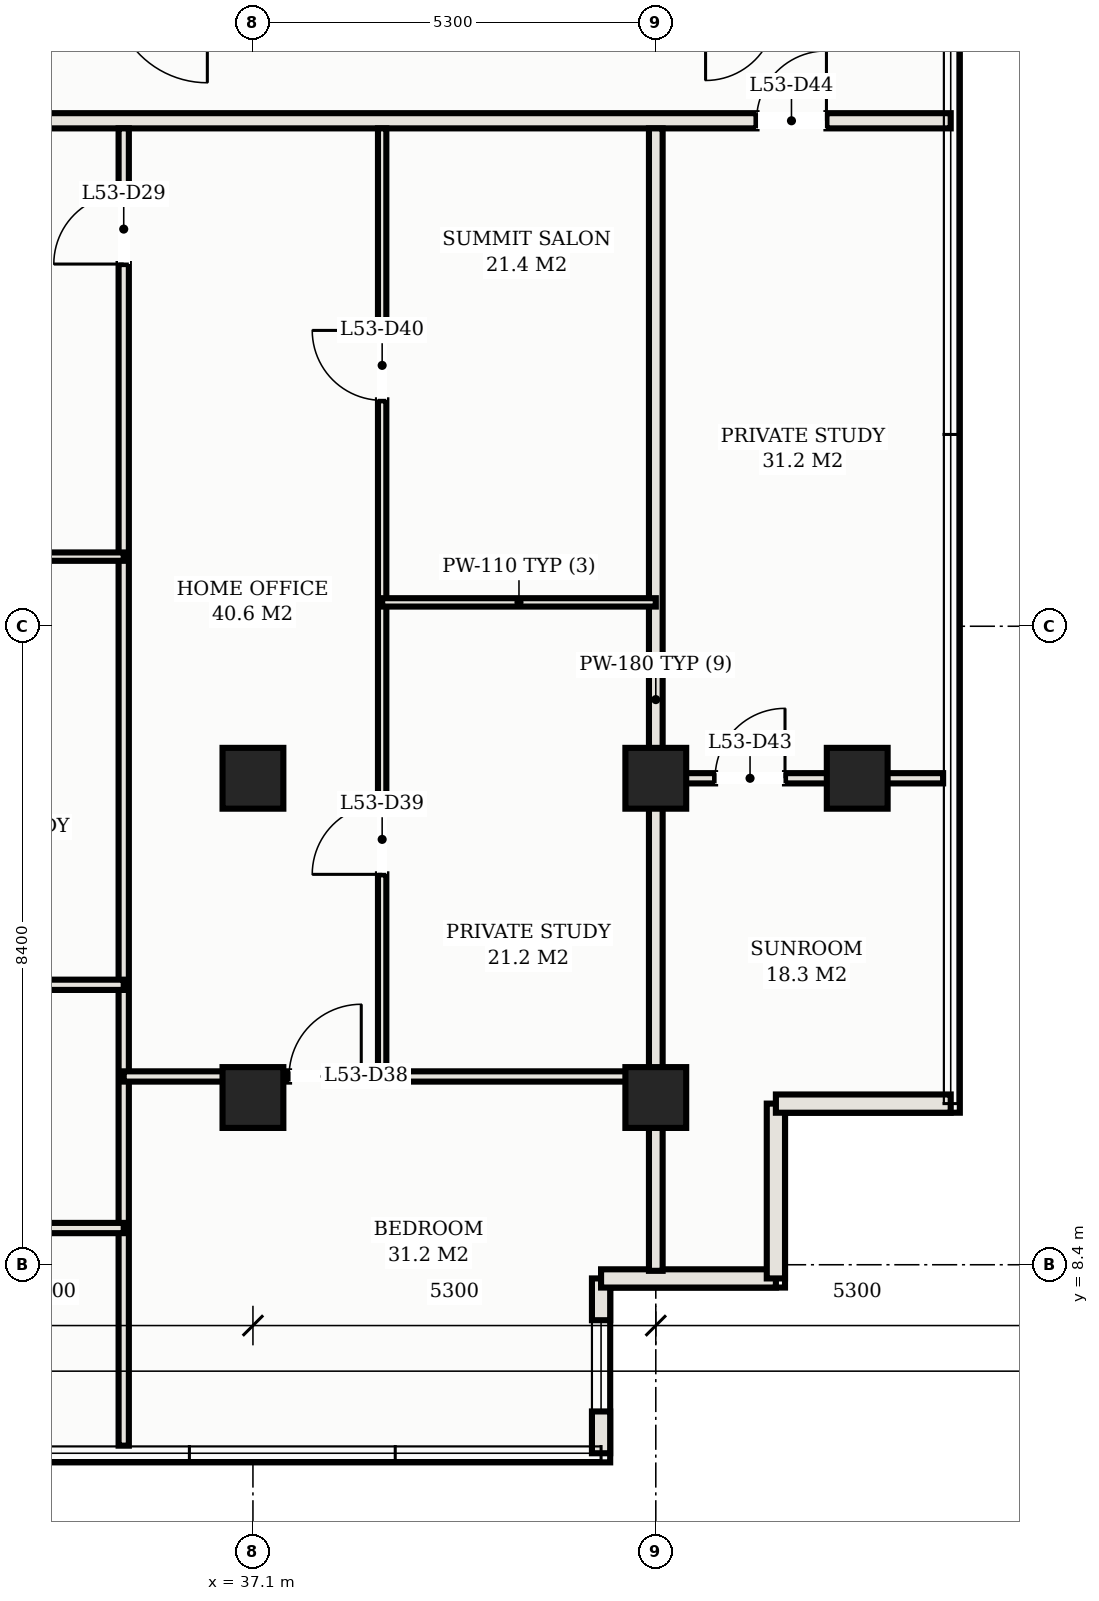
"""IFC4 building model, lengths in metres.
Left out: names, types, materials, properties, quantities, classifications, styles, units other than length and angle.
Written with IfcOpenShell. Run it as: python <this file> out.ifc"""

import sys

from ifc_helpers import new_model, si_unit, direction, frame, frame_2d, origin, origin_2d, place, context, subcontext, project, spatial, rectangle, hollow_rectangle, extrude, element, fill, save


model = new_model("IFC4")
c1 = context("Model", 3, precision=1e-05, world=origin(), true_north=direction((0.0, 1.0)))
c2 = subcontext(c1, "Body", "Model", "MODEL_VIEW")
j1 = project(units=[si_unit("LENGTHUNIT", "METRE"), si_unit("PLANEANGLEUNIT", "RADIAN")], contexts=[c1])
p1 = place(None, origin())
s1 = spatial("IfcSite", under=j1, at=p1, CompositionType="ELEMENT")
p2 = place(p1, origin())
s2 = spatial("IfcBuilding", under=s1, at=p2, CompositionType="ELEMENT")
p3 = place(p2, frame((0.0, 0.0, 196.7)))
s3 = spatial("IfcBuildingStorey", under=s2, at=p3, CompositionType="ELEMENT", Elevation=196.7)
for number, where, z_axis, x_axis in (
    (1, (37.1, 14.8, 0.0), (0.0, 0.0, 1.0), (1.0, 0.0, 0.0)),
    (2, (37.1, 10.6, 0.0), (0.0, 0.0, 1.0), (1.0, 0.0, 0.0)),
    (3, (42.4, 14.8, 0.0), (0.0, 0.0, 1.0), (1.0, 0.0, 0.0)),
    (4, (42.4, 10.6, 0.0), (0.0, 0.0, 1.0), (1.0, 0.0, 0.0)),
    (5, (45.05, 14.8, 0.0), (0.0, 0.0, 1.0), (1.0, 0.0, 0.0)),
):
    element("IfcColumn", number, at=place(p3, frame(where, z_axis=z_axis, x_axis=x_axis)), inside=s3, PredefinedType="COLUMN", context=c2, shape_type="SweptSolid", body=[
        extrude(hollow_rectangle(XDim=0.8, YDim=0.8, WallThickness=0.028, at=origin_2d()), origin(), (0.0, 0.0, 1.0), 3.3),
    ])
p4 = place(p3, frame((41.68, 5.92, 0.0), z_axis=(0.0, 0.0, 1.0), x_axis=(0.0, 1.0, 0.0)))
e6 = element("IfcWall", 6, at=p4, inside=s3, PredefinedType="SOLIDWALL", context=c2, shape_type="SweptSolid", body=[
    extrude(rectangle(XDim=2.3, YDim=0.24, at=frame_2d((1.15, 0.0))), origin(), (0.0, 0.0, 1.0), 3.11),
])
p5 = place(p4, frame((0.55, 0.0, 0.75)))
e7 = element("IfcOpeningElement", 7, at=p5, cuts=e6, PredefinedType="OPENING", context=c2, shape_type="SweptSolid", body=[
    extrude(rectangle(XDim=1.2, YDim=1.5, at=frame_2d((0.6, 0.75))), frame((0.0, 0.13, 0.0), z_axis=(0.0, -1.0, 0.0), x_axis=(1.0, 0.0, 0.0)), (0.0, 0.0, 1.0), 0.26),
])
for number, where, z_axis, x_axis in (
    (8, (41.68, 8.22, 0.0), (0.0, 0.0, 1.0), (1.0, 0.0, 0.0)),
    (9, (43.98, 8.22, 0.0), (0.0, 0.0, 1.0), (0.0, 1.0, 0.0)),
    (10, (43.98, 10.52, 0.0), (0.0, 0.0, 1.0), (1.0, 0.0, 0.0)),
):
    element("IfcWall", number, at=place(p3, frame(where, z_axis=z_axis, x_axis=x_axis)), inside=s3, PredefinedType="SOLIDWALL", context=c2, shape_type="SweptSolid", body=[
        extrude(rectangle(XDim=2.3, YDim=0.24, at=frame_2d((1.15, 0.0))), origin(), (0.0, 0.0, 1.0), 3.11),
    ])
p6 = place(p3, frame((6.72, 23.45, 0.0), z_axis=(0.0, 0.0, 1.0), x_axis=(1.0, 0.0, 0.0)))
e11 = element("IfcWall", 11, at=p6, inside=s3, PredefinedType="PARTITIONING", context=c2, shape_type="SweptSolid", body=[
    extrude(rectangle(XDim=39.56, YDim=0.2, at=frame_2d((19.78, 0.0))), origin(), (0.0, 0.0, 1.0), 2.43),
])
p7 = place(p6, frame((4.63, 0.0, 0.0)))
e12 = element("IfcOpeningElement", 12, at=p7, cuts=e11, PredefinedType="OPENING", context=c2, shape_type="SweptSolid", body=[
    extrude(rectangle(XDim=1.1, YDim=2.25, at=frame_2d((0.55, 1.125))), frame((0.0, 0.11, 0.0), z_axis=(0.0, -1.0, 0.0), x_axis=(1.0, 0.0, 0.0)), (0.0, 0.0, 1.0), 0.22),
])
p8 = place(p6, frame((9.93, 0.0, 0.0)))
e13 = element("IfcOpeningElement", 13, at=p8, cuts=e11, PredefinedType="OPENING", context=c2, shape_type="SweptSolid", body=[
    extrude(rectangle(XDim=1.1, YDim=2.25, at=frame_2d((0.55, 1.125))), frame((0.0, 0.11, 0.0), z_axis=(0.0, -1.0, 0.0), x_axis=(1.0, 0.0, 0.0)), (0.0, 0.0, 1.0), 0.22),
])
p9 = place(p6, frame((15.23, 0.0, 0.0)))
e14 = element("IfcOpeningElement", 14, at=p9, cuts=e11, PredefinedType="OPENING", context=c2, shape_type="SweptSolid", body=[
    extrude(rectangle(XDim=1.1, YDim=2.25, at=frame_2d((0.55, 1.125))), frame((0.0, 0.11, 0.0), z_axis=(0.0, -1.0, 0.0), x_axis=(1.0, 0.0, 0.0)), (0.0, 0.0, 1.0), 0.22),
])
p10 = place(p6, frame((1.635, 0.0, 0.0)))
e15 = element("IfcOpeningElement", 15, at=p10, cuts=e11, PredefinedType="OPENING", context=c2, shape_type="SweptSolid", body=[
    extrude(rectangle(XDim=0.92, YDim=2.15, at=frame_2d((0.46, 1.075))), frame((0.0, 0.11, 0.0), z_axis=(0.0, -1.0, 0.0), x_axis=(1.0, 0.0, 0.0)), (0.0, 0.0, 1.0), 0.22),
])
p11 = place(p6, frame((37.005, 0.0, 0.0)))
e16 = element("IfcOpeningElement", 16, at=p11, cuts=e11, PredefinedType="OPENING", context=c2, shape_type="SweptSolid", body=[
    extrude(rectangle(XDim=0.92, YDim=2.15, at=frame_2d((0.46, 1.075))), frame((0.0, 0.11, 0.0), z_axis=(0.0, -1.0, 0.0), x_axis=(1.0, 0.0, 0.0)), (0.0, 0.0, 1.0), 0.22),
])
p12 = place(p3, frame((42.4, 8.32, 0.0), z_axis=(0.0, 0.0, 1.0), x_axis=(0.0, 1.0, 0.0)))
e17 = element("IfcWall", 17, at=p12, inside=s3, PredefinedType="PARTITIONING", context=c2, shape_type="SweptSolid", body=[
    extrude(rectangle(XDim=15.03, YDim=0.18, at=frame_2d((7.515, 0.0))), origin(), (0.0, 0.0, 1.0), 2.43),
])
p13 = place(p3, frame((35.4, 6.02, 0.0), z_axis=(0.0, 0.0, 1.0), x_axis=(0.0, 1.0, 0.0)))
e18 = element("IfcWall", 18, at=p13, inside=s3, PredefinedType="PARTITIONING", context=c2, shape_type="SweptSolid", body=[
    extrude(rectangle(XDim=17.33, YDim=0.135, at=frame_2d((8.665, 0.0))), origin(), (0.0, 0.0, 1.0), 2.43),
])
p14 = place(p13, frame((15.545, 0.0, 0.0)))
e19 = element("IfcOpeningElement", 19, at=p14, cuts=e18, PredefinedType="OPENING", context=c2, shape_type="SweptSolid", body=[
    extrude(rectangle(XDim=0.92, YDim=2.15, at=frame_2d((0.46, 1.075))), frame((0.0, 0.078, 0.0), z_axis=(0.0, -1.0, 0.0), x_axis=(1.0, 0.0, 0.0)), (0.0, 0.0, 1.0), 0.155),
])
p15 = place(p3, frame((26.5, 8.883, 0.0), z_axis=(0.0, 0.0, 1.0), x_axis=(1.0, 0.0, 0.0)))
e20 = element("IfcWall", 20, at=p15, inside=s3, PredefinedType="PARTITIONING", context=c2, shape_type="SweptSolid", body=[
    extrude(rectangle(XDim=8.9, YDim=0.135, at=frame_2d((4.45, 0.0))), origin(), (0.0, 0.0, 1.0), 2.43),
])
p16 = place(p15, frame((2.175, 0.0, 0.0)))
e21 = element("IfcOpeningElement", 21, at=p16, cuts=e20, PredefinedType="OPENING", context=c2, shape_type="SweptSolid", body=[
    extrude(rectangle(XDim=0.95, YDim=2.15, at=frame_2d((0.475, 1.075))), frame((0.0, 0.078, 0.0), z_axis=(0.0, -1.0, 0.0), x_axis=(1.0, 0.0, 0.0)), (0.0, 0.0, 1.0), 0.155),
])
p17 = place(p15, frame((6.65, 0.0, 0.0)))
e22 = element("IfcOpeningElement", 22, at=p17, cuts=e20, PredefinedType="OPENING", context=c2, shape_type="SweptSolid", body=[
    extrude(rectangle(XDim=0.9, YDim=2.15, at=frame_2d((0.45, 1.075))), frame((0.0, 0.078, 0.0), z_axis=(0.0, -1.0, 0.0), x_axis=(1.0, 0.0, 0.0)), (0.0, 0.0, 1.0), 0.155),
])
p18 = place(p3, frame((31.8, 12.083, 0.0), z_axis=(0.0, 0.0, 1.0), x_axis=(1.0, 0.0, 0.0)))
e23 = element("IfcWall", 23, at=p18, inside=s3, PredefinedType="PARTITIONING", context=c2, shape_type="SweptSolid", body=[
    extrude(rectangle(XDim=3.6, YDim=0.135, at=frame_2d((1.8, 0.0))), origin(), (0.0, 0.0, 1.0), 2.43),
])
p19 = place(p3, frame((31.8, 17.716, 0.0), z_axis=(0.0, 0.0, 1.0), x_axis=(1.0, 0.0, 0.0)))
e24 = element("IfcWall", 24, at=p19, inside=s3, PredefinedType="MOVABLE", context=c2, shape_type="SweptSolid", body=[
    extrude(rectangle(XDim=3.6, YDim=0.11, at=frame_2d((1.8, 0.0))), origin(), (0.0, 0.0, 1.0), 2.43),
])
p20 = place(p19, frame((1.34, 0.0, 0.0)))
e25 = element("IfcOpeningElement", 25, at=p20, cuts=e24, PredefinedType="OPENING", context=c2, shape_type="SweptSolid", body=[
    extrude(rectangle(XDim=0.92, YDim=2.15, at=frame_2d((0.46, 1.075))), frame((0.0, 0.065, 0.0), z_axis=(0.0, -1.0, 0.0), x_axis=(1.0, 0.0, 0.0)), (0.0, 0.0, 1.0), 0.13),
])
p21 = place(p3, frame((35.4, 10.877, 0.0), z_axis=(0.0, 0.0, 1.0), x_axis=(1.0, 0.0, 0.0)))
e26 = element("IfcWall", 26, at=p21, inside=s3, PredefinedType="PARTITIONING", context=c2, shape_type="SweptSolid", body=[
    extrude(rectangle(XDim=7.0, YDim=0.135, at=frame_2d((3.5, 0.0))), origin(), (0.0, 0.0, 1.0), 2.43),
])
p22 = place(p21, frame((2.175, 0.0, 0.0)))
e27 = element("IfcOpeningElement", 27, at=p22, cuts=e26, PredefinedType="OPENING", context=c2, shape_type="SweptSolid", body=[
    extrude(rectangle(XDim=0.95, YDim=2.15, at=frame_2d((0.475, 1.075))), frame((0.0, 0.078, 0.0), z_axis=(0.0, -1.0, 0.0), x_axis=(1.0, 0.0, 0.0)), (0.0, 0.0, 1.0), 0.155),
])
p23 = place(p3, frame((38.8, 10.877, 0.0), z_axis=(0.0, 0.0, 1.0), x_axis=(0.0, 1.0, 0.0)))
e28 = element("IfcWall", 28, at=p23, inside=s3, PredefinedType="MOVABLE", context=c2, shape_type="SweptSolid", body=[
    extrude(rectangle(XDim=12.473, YDim=0.11, at=frame_2d((6.237, 0.0))), origin(), (0.0, 0.0, 1.0), 2.43),
])
p24 = place(p23, frame((2.659, 0.0, 0.0)))
e29 = element("IfcOpeningElement", 29, at=p24, cuts=e28, PredefinedType="OPENING", context=c2, shape_type="SweptSolid", body=[
    extrude(rectangle(XDim=0.92, YDim=2.15, at=frame_2d((0.46, 1.075))), frame((0.0, 0.065, 0.0), z_axis=(0.0, -1.0, 0.0), x_axis=(1.0, 0.0, 0.0)), (0.0, 0.0, 1.0), 0.13),
])
p25 = place(p23, frame((8.895, 0.0, 0.0)))
e30 = element("IfcOpeningElement", 30, at=p25, cuts=e28, PredefinedType="OPENING", context=c2, shape_type="SweptSolid", body=[
    extrude(rectangle(XDim=0.92, YDim=2.15, at=frame_2d((0.46, 1.075))), frame((0.0, 0.065, 0.0), z_axis=(0.0, -1.0, 0.0), x_axis=(1.0, 0.0, 0.0)), (0.0, 0.0, 1.0), 0.13),
])
p26 = place(p3, frame((38.8, 17.114, 0.0), z_axis=(0.0, 0.0, 1.0), x_axis=(1.0, 0.0, 0.0)))
e31 = element("IfcWall", 31, at=p26, inside=s3, PredefinedType="MOVABLE", context=c2, shape_type="SweptSolid", body=[
    extrude(rectangle(XDim=3.6, YDim=0.11, at=frame_2d((1.8, 0.0))), origin(), (0.0, 0.0, 1.0), 2.43),
])
p27 = place(p3, frame((42.4, 14.8, 0.0), z_axis=(0.0, 0.0, 1.0), x_axis=(1.0, 0.0, 0.0)))
e32 = element("IfcWall", 32, at=p27, inside=s3, PredefinedType="PARTITIONING", context=c2, shape_type="SweptSolid", body=[
    extrude(rectangle(XDim=3.78, YDim=0.135, at=frame_2d((1.89, 0.0))), origin(), (0.0, 0.0, 1.0), 2.43),
])
p28 = place(p27, frame((0.78, 0.0, 0.0)))
e33 = element("IfcOpeningElement", 33, at=p28, cuts=e32, PredefinedType="OPENING", context=c2, shape_type="SweptSolid", body=[
    extrude(rectangle(XDim=0.92, YDim=2.15, at=frame_2d((0.46, 1.075))), frame((0.0, 0.078, 0.0), z_axis=(0.0, -1.0, 0.0), x_axis=(1.0, 0.0, 0.0)), (0.0, 0.0, 1.0), 0.155),
])
p29 = place(p5, origin())
e34 = element("IfcWindow", 34, at=p29, inside=s3, PartitioningType="SINGLE_PANEL", PredefinedType="WINDOW", context=c2, shape_type="SweptSolid", body=[
    extrude(rectangle(XDim=1.2, YDim=1.5, at=frame_2d((0.6, 0.75))), frame((0.0, 0.03, 0.0), z_axis=(0.0, -1.0, 0.0), x_axis=(1.0, 0.0, 0.0)), (0.0, 0.0, 1.0), 0.06),
])
fill(e7, e34)
p30 = place(p14, origin())
e35 = element("IfcDoor", 35, at=p30, inside=s3, OperationType="SINGLE_SWING_LEFT", PredefinedType="DOOR", context=c2, shape_type="SweptSolid", body=[
    extrude(rectangle(XDim=0.92, YDim=2.15, at=frame_2d((0.46, 1.075))), frame((0.0, 0.025, 0.0), z_axis=(0.0, -1.0, 0.0), x_axis=(1.0, 0.0, 0.0)), (0.0, 0.0, 1.0), 0.05),
])
fill(e19, e35)
p31 = place(p22, origin())
e36 = element("IfcDoor", 36, at=p31, inside=s3, OperationType="SINGLE_SWING_RIGHT", PredefinedType="DOOR", context=c2, shape_type="SweptSolid", body=[
    extrude(rectangle(XDim=0.95, YDim=2.15, at=frame_2d((0.475, 1.075))), frame((0.0, 0.025, 0.0), z_axis=(0.0, -1.0, 0.0), x_axis=(1.0, 0.0, 0.0)), (0.0, 0.0, 1.0), 0.05),
])
fill(e27, e36)
p32 = place(p24, origin())
e37 = element("IfcDoor", 37, at=p32, inside=s3, OperationType="SINGLE_SWING_LEFT", PredefinedType="DOOR", context=c2, shape_type="SweptSolid", body=[
    extrude(rectangle(XDim=0.92, YDim=2.15, at=frame_2d((0.46, 1.075))), frame((0.0, 0.025, 0.0), z_axis=(0.0, -1.0, 0.0), x_axis=(1.0, 0.0, 0.0)), (0.0, 0.0, 1.0), 0.05),
])
fill(e29, e37)
p33 = place(p25, origin())
e38 = element("IfcDoor", 38, at=p33, inside=s3, OperationType="SINGLE_SWING_RIGHT", PredefinedType="DOOR", context=c2, shape_type="SweptSolid", body=[
    extrude(rectangle(XDim=0.92, YDim=2.15, at=frame_2d((0.46, 1.075))), frame((0.0, 0.025, 0.0), z_axis=(0.0, -1.0, 0.0), x_axis=(1.0, 0.0, 0.0)), (0.0, 0.0, 1.0), 0.05),
])
fill(e30, e38)
p34 = place(p28, origin())
e39 = element("IfcDoor", 39, at=p34, inside=s3, OperationType="SINGLE_SWING_RIGHT", PredefinedType="DOOR", context=c2, shape_type="SweptSolid", body=[
    extrude(rectangle(XDim=0.92, YDim=2.15, at=frame_2d((0.46, 1.075))), frame((0.0, 0.025, 0.0), z_axis=(0.0, -1.0, 0.0), x_axis=(1.0, 0.0, 0.0)), (0.0, 0.0, 1.0), 0.05),
])
fill(e33, e39)
p35 = place(p11, origin())
e40 = element("IfcDoor", 40, at=p35, inside=s3, OperationType="SINGLE_SWING_RIGHT", PredefinedType="DOOR", context=c2, shape_type="SweptSolid", body=[
    extrude(rectangle(XDim=0.92, YDim=2.15, at=frame_2d((0.46, 1.075))), frame((0.0, 0.025, 0.0), z_axis=(0.0, -1.0, 0.0), x_axis=(1.0, 0.0, 0.0)), (0.0, 0.0, 1.0), 0.05),
])
fill(e16, e40)
save(model, sys.argv[1])
